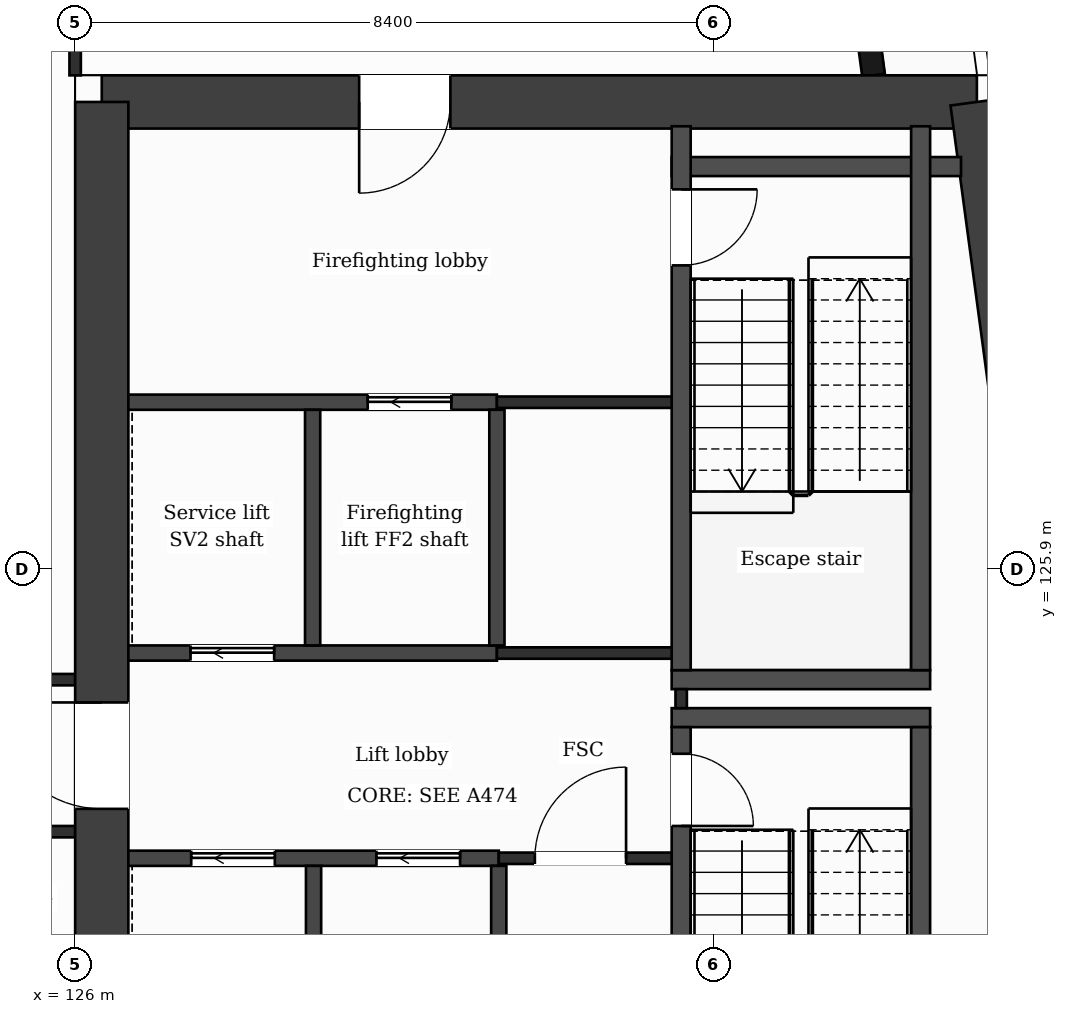
"""IFC4 building model, lengths in metres.
Left out: names, types, materials, properties, quantities, classifications, styles, units other than length and angle.
Written with IfcOpenShell. Run it as: python <this file> out.ifc"""

import sys

from ifc_helpers import new_model, si_unit, direction, frame, frame_2d, origin, place, context, subcontext, project, spatial, rectangle, extrude, element, fill, save


model = new_model("IFC4")
c1 = context("Model", 3, precision=1e-05, world=origin(), true_north=direction((0.0, 1.0)))
c2 = subcontext(c1, "Body", "Model", "MODEL_VIEW")
j1 = project(units=[si_unit("LENGTHUNIT", "METRE"), si_unit("PLANEANGLEUNIT", "RADIAN")], contexts=[c1])
p1 = place(None, origin())
s1 = spatial("IfcSite", under=j1, at=p1, CompositionType="ELEMENT")
p2 = place(p1, origin())
s2 = spatial("IfcBuilding", under=s1, at=p2, CompositionType="ELEMENT")
p3 = place(p2, frame((0.0, 0.0, 299.7)))
s3 = spatial("IfcBuildingStorey", under=s2, at=p3, CompositionType="ELEMENT", Elevation=299.7)
p4 = place(p3, frame((126.35, 132.05, 0.0), z_axis=(0.0, 0.0, 1.0), x_axis=(1.0, 0.0, 0.0)))
e1 = element("IfcWall", 1, at=p4, inside=s3, PredefinedType="SHEAR", context=c2, shape_type="SweptSolid", body=[
    extrude(rectangle(XDim=11.513, YDim=0.7, at=frame_2d((5.757, 0.0))), origin(), (0.0, 0.0, 1.0), 3.7),
])
p5 = place(p4, frame((3.386, 0.0, 0.0)))
e2 = element("IfcOpeningElement", 2, at=p5, cuts=e1, PredefinedType="OPENING", context=c2, shape_type="SweptSolid", body=[
    extrude(rectangle(XDim=1.2, YDim=2.1, at=frame_2d((0.6, 1.05))), frame((0.0, 0.36, 0.0), z_axis=(0.0, -1.0, 0.0), x_axis=(1.0, 0.0, 0.0)), (0.0, 0.0, 1.0), 0.72),
])
p6 = place(p3, frame((137.863, 132.05, 0.0), z_axis=(0.0, 0.0, 1.0), x_axis=(0.133401241494, -0.991062111458, 0.0)))
e3 = element("IfcWall", 3, at=p6, inside=s3, PredefinedType="SHEAR", context=c2, shape_type="SweptSolid", body=[
    extrude(rectangle(XDim=15.842, YDim=0.7, at=frame_2d((7.921, 0.0))), origin(), (0.0, 0.0, 1.0), 3.7),
])
p7 = place(p3, frame((126.35, 116.35, 0.0), z_axis=(0.0, 0.0, 1.0), x_axis=(0.0, 1.0, 0.0)))
e4 = element("IfcWall", 4, at=p7, inside=s3, PredefinedType="SHEAR", context=c2, shape_type="SweptSolid", body=[
    extrude(rectangle(XDim=15.7, YDim=0.7, at=frame_2d((7.85, 0.0))), origin(), (0.0, 0.0, 1.0), 3.7),
])
p8 = place(p7, frame((6.4, 0.0, 0.0)))
e5 = element("IfcOpeningElement", 5, at=p8, cuts=e4, PredefinedType="OPENING", context=c2, shape_type="SweptSolid", body=[
    extrude(rectangle(XDim=1.4, YDim=2.1, at=frame_2d((0.7, 1.05))), frame((0.0, 0.36, 0.0), z_axis=(0.0, -1.0, 0.0), x_axis=(1.0, 0.0, 0.0)), (0.0, 0.0, 1.0), 0.72),
])
p9 = place(p3, frame((136.504, 132.4, 0.0), z_axis=(0.0, 0.0, 1.0), x_axis=(-0.133399697462, 0.99106231929, 0.0)))
e6 = element("IfcWall", 6, at=p9, inside=s3, PredefinedType="SOLIDWALL", context=c2, shape_type="SweptSolid", body=[
    extrude(rectangle(XDim=6.74, YDim=0.3, at=frame_2d((3.37, 0.0))), origin(), (0.0, 0.0, 1.0), 3.25),
])
p10 = place(p9, frame((1.115, 0.0, 0.0)))
e7 = element("IfcOpeningElement", 7, at=p10, cuts=e6, PredefinedType="OPENING", context=c2, shape_type="SweptSolid", body=[
    extrude(rectangle(XDim=1.2, YDim=2.4, at=frame_2d((0.6, 1.2))), frame((0.0, 0.16, 0.0), z_axis=(0.0, -1.0, 0.0), x_axis=(1.0, 0.0, 0.0)), (0.0, 0.0, 1.0), 0.32),
])
p11 = place(p9, frame((4.436, 0.0, 0.9)))
e8 = element("IfcOpeningElement", 8, at=p11, cuts=e6, PredefinedType="OPENING", context=c2, shape_type="SweptSolid", body=[
    extrude(rectangle(XDim=1.2, YDim=2.1, at=frame_2d((0.6, 1.05))), frame((0.0, 0.16, 0.0), z_axis=(0.0, -1.0, 0.0), x_axis=(1.0, 0.0, 0.0)), (0.0, 0.0, 1.0), 0.32),
])
p12 = place(p3, frame((126.7, 122.1, 0.0), z_axis=(0.0, 0.0, 1.0), x_axis=(1.0, 0.0, 0.0)))
e9 = element("IfcWall", 9, at=p12, inside=s3, PredefinedType="PARTITIONING", context=c2, shape_type="SweptSolid", body=[
    extrude(rectangle(XDim=4.873, YDim=0.2, at=frame_2d((2.437, 0.0))), origin(), (0.0, 0.0, 1.0), 3.25),
])
p13 = place(p12, frame((3.264, 0.0, 0.0)))
e10 = element("IfcOpeningElement", 10, at=p13, cuts=e9, PredefinedType="OPENING", context=c2, shape_type="SweptSolid", body=[
    extrude(rectangle(XDim=1.1, YDim=2.1, at=frame_2d((0.55, 1.05))), frame((0.0, 0.11, 0.0), z_axis=(0.0, -1.0, 0.0), x_axis=(1.0, 0.0, 0.0)), (0.0, 0.0, 1.0), 0.22),
])
p14 = place(p12, frame((0.827, 0.0, 0.0)))
e11 = element("IfcOpeningElement", 11, at=p14, cuts=e9, PredefinedType="OPENING", context=c2, shape_type="SweptSolid", body=[
    extrude(rectangle(XDim=1.1, YDim=2.1, at=frame_2d((0.55, 1.05))), frame((0.0, 0.11, 0.0), z_axis=(0.0, -1.0, 0.0), x_axis=(1.0, 0.0, 0.0)), (0.0, 0.0, 1.0), 0.22),
])
p15 = place(p3, frame((131.573, 122.1, 0.0), z_axis=(0.0, 0.0, 1.0), x_axis=(1.0, 0.0, 0.0)))
e12 = element("IfcWall", 12, at=p15, inside=s3, PredefinedType="PARTITIONING", context=c2, shape_type="SweptSolid", body=[
    extrude(rectangle(XDim=2.4, YDim=0.15, at=frame_2d((1.2, 0.0))), origin(), (0.0, 0.0, 1.0), 3.25),
])
p16 = place(p15, frame((0.475, 0.0, 0.0)))
e13 = element("IfcOpeningElement", 13, at=p16, cuts=e12, PredefinedType="OPENING", context=c2, shape_type="SweptSolid", body=[
    extrude(rectangle(XDim=1.2, YDim=2.1, at=frame_2d((0.6, 1.05))), frame((0.0, 0.085, 0.0), z_axis=(0.0, -1.0, 0.0), x_axis=(1.0, 0.0, 0.0)), (0.0, 0.0, 1.0), 0.17),
])
p17 = place(p3, frame((100.8, 122.45, 0.0), z_axis=(0.0, 0.0, 1.0), x_axis=(1.0, 0.0, 0.0)))
e14 = element("IfcWall", 14, at=p17, inside=s3, PredefinedType="PARTITIONING", context=c2, shape_type="SweptSolid", body=[
    extrude(rectangle(XDim=25.2, YDim=0.15, at=frame_2d((12.6, 0.0))), origin(), (0.0, 0.0, 1.0), 3.25),
])
p18 = place(p17, frame((1.6, 0.0, 0.0)))
e15 = element("IfcOpeningElement", 15, at=p18, cuts=e14, PredefinedType="OPENING", context=c2, shape_type="SweptSolid", body=[
    extrude(rectangle(XDim=1.0, YDim=2.1, at=frame_2d((0.5, 1.05))), frame((0.0, 0.085, 0.0), z_axis=(0.0, -1.0, 0.0), x_axis=(1.0, 0.0, 0.0)), (0.0, 0.0, 1.0), 0.17),
])
p19 = place(p17, frame((11.12, 0.0, 0.0)))
e16 = element("IfcOpeningElement", 16, at=p19, cuts=e14, PredefinedType="OPENING", context=c2, shape_type="SweptSolid", body=[
    extrude(rectangle(XDim=0.95, YDim=2.1, at=frame_2d((0.475, 1.05))), frame((0.0, 0.085, 0.0), z_axis=(0.0, -1.0, 0.0), x_axis=(1.0, 0.0, 0.0)), (0.0, 0.0, 1.0), 0.17),
])
p20 = place(p17, frame((13.05, 0.0, 0.0)))
e17 = element("IfcOpeningElement", 17, at=p20, cuts=e14, PredefinedType="OPENING", context=c2, shape_type="SweptSolid", body=[
    extrude(rectangle(XDim=1.0, YDim=2.1, at=frame_2d((0.5, 1.05))), frame((0.0, 0.085, 0.0), z_axis=(0.0, -1.0, 0.0), x_axis=(1.0, 0.0, 0.0)), (0.0, 0.0, 1.0), 0.17),
])
p21 = place(p17, frame((19.61, 0.0, 0.0)))
e18 = element("IfcOpeningElement", 18, at=p21, cuts=e14, PredefinedType="OPENING", context=c2, shape_type="SweptSolid", body=[
    extrude(rectangle(XDim=0.95, YDim=2.1, at=frame_2d((0.475, 1.05))), frame((0.0, 0.085, 0.0), z_axis=(0.0, -1.0, 0.0), x_axis=(1.0, 0.0, 0.0)), (0.0, 0.0, 1.0), 0.17),
])
p22 = place(p17, frame((21.275, 0.0, 0.0)))
e19 = element("IfcOpeningElement", 19, at=p22, cuts=e14, PredefinedType="OPENING", context=c2, shape_type="SweptSolid", body=[
    extrude(rectangle(XDim=0.95, YDim=2.1, at=frame_2d((0.475, 1.05))), frame((0.0, 0.085, 0.0), z_axis=(0.0, -1.0, 0.0), x_axis=(1.0, 0.0, 0.0)), (0.0, 0.0, 1.0), 0.17),
])
for number, where, z_axis, x_axis in (
    (20, (133.848, 123.95, 0.0), (0.0, 0.0, 1.0), (1.0, 0.0, 0.0)),
    (21, (133.848, 124.45, 0.0), (0.0, 0.0, 1.0), (1.0, 0.0, 0.0)),
):
    element("IfcWall", number, at=place(p3, frame(where, z_axis=z_axis, x_axis=x_axis)), inside=s3, PredefinedType="PARTITIONING", context=c2, shape_type="SweptSolid", body=[
        extrude(rectangle(XDim=3.4, YDim=0.25, at=frame_2d((1.7, 0.0))), origin(), (0.0, 0.0, 1.0), 3.25),
    ])
p23 = place(p3, frame((100.8, 124.45, 0.0), z_axis=(0.0, 0.0, 1.0), x_axis=(1.0, 0.0, 0.0)))
e22 = element("IfcWall", 22, at=p23, inside=s3, PredefinedType="PARTITIONING", context=c2, shape_type="SweptSolid", body=[
    extrude(rectangle(XDim=25.2, YDim=0.15, at=frame_2d((12.6, 0.0))), origin(), (0.0, 0.0, 1.0), 3.25),
])
p24 = place(p23, frame((1.85, 0.0, 0.0)))
e23 = element("IfcOpeningElement", 23, at=p24, cuts=e22, PredefinedType="OPENING", context=c2, shape_type="SweptSolid", body=[
    extrude(rectangle(XDim=1.0, YDim=2.1, at=frame_2d((0.5, 1.05))), frame((0.0, 0.085, 0.0), z_axis=(0.0, -1.0, 0.0), x_axis=(1.0, 0.0, 0.0)), (0.0, 0.0, 1.0), 0.17),
])
p25 = place(p23, frame((6.425, 0.0, 0.0)))
e24 = element("IfcOpeningElement", 24, at=p25, cuts=e22, PredefinedType="OPENING", context=c2, shape_type="SweptSolid", body=[
    extrude(rectangle(XDim=1.0, YDim=2.1, at=frame_2d((0.5, 1.05))), frame((0.0, 0.085, 0.0), z_axis=(0.0, -1.0, 0.0), x_axis=(1.0, 0.0, 0.0)), (0.0, 0.0, 1.0), 0.17),
])
p26 = place(p23, frame((9.4, 0.0, 0.0)))
e25 = element("IfcOpeningElement", 25, at=p26, cuts=e22, PredefinedType="OPENING", context=c2, shape_type="SweptSolid", body=[
    extrude(rectangle(XDim=1.0, YDim=2.1, at=frame_2d((0.5, 1.05))), frame((0.0, 0.085, 0.0), z_axis=(0.0, -1.0, 0.0), x_axis=(1.0, 0.0, 0.0)), (0.0, 0.0, 1.0), 0.17),
])
p27 = place(p23, frame((14.825, 0.0, 0.0)))
e26 = element("IfcOpeningElement", 26, at=p27, cuts=e22, PredefinedType="OPENING", context=c2, shape_type="SweptSolid", body=[
    extrude(rectangle(XDim=1.0, YDim=2.1, at=frame_2d((0.5, 1.05))), frame((0.0, 0.085, 0.0), z_axis=(0.0, -1.0, 0.0), x_axis=(1.0, 0.0, 0.0)), (0.0, 0.0, 1.0), 0.17),
])
p28 = place(p23, frame((18.825, 0.0, 0.0)))
e27 = element("IfcOpeningElement", 27, at=p28, cuts=e22, PredefinedType="OPENING", context=c2, shape_type="SweptSolid", body=[
    extrude(rectangle(XDim=1.0, YDim=2.1, at=frame_2d((0.5, 1.05))), frame((0.0, 0.085, 0.0), z_axis=(0.0, -1.0, 0.0), x_axis=(1.0, 0.0, 0.0)), (0.0, 0.0, 1.0), 0.17),
])
p29 = place(p3, frame((126.7, 124.8, 0.0), z_axis=(0.0, 0.0, 1.0), x_axis=(1.0, 0.0, 0.0)))
e28 = element("IfcWall", 28, at=p29, inside=s3, PredefinedType="PARTITIONING", context=c2, shape_type="SweptSolid", body=[
    extrude(rectangle(XDim=4.849, YDim=0.2, at=frame_2d((2.424, 0.0))), origin(), (0.0, 0.0, 1.0), 3.25),
])
p30 = place(p29, frame((0.818, 0.0, 0.0)))
e29 = element("IfcOpeningElement", 29, at=p30, cuts=e28, PredefinedType="OPENING", context=c2, shape_type="SweptSolid", body=[
    extrude(rectangle(XDim=1.1, YDim=2.1, at=frame_2d((0.55, 1.05))), frame((0.0, 0.11, 0.0), z_axis=(0.0, -1.0, 0.0), x_axis=(1.0, 0.0, 0.0)), (0.0, 0.0, 1.0), 0.22),
])
p31 = place(p3, frame((131.549, 124.8, 0.0), z_axis=(0.0, 0.0, 1.0), x_axis=(1.0, 0.0, 0.0)))
e30 = element("IfcWall", 30, at=p31, inside=s3, PredefinedType="PARTITIONING", context=c2, shape_type="SweptSolid", body=[
    extrude(rectangle(XDim=2.549, YDim=0.15, at=frame_2d((1.275, 0.0))), origin(), (0.0, 0.0, 1.0), 3.25),
])
p32 = place(p3, frame((126.7, 128.1, 0.0), z_axis=(0.0, 0.0, 1.0), x_axis=(1.0, 0.0, 0.0)))
e31 = element("IfcWall", 31, at=p32, inside=s3, PredefinedType="PARTITIONING", context=c2, shape_type="SweptSolid", body=[
    extrude(rectangle(XDim=4.849, YDim=0.2, at=frame_2d((2.424, 0.0))), origin(), (0.0, 0.0, 1.0), 3.25),
])
p33 = place(p32, frame((3.149, 0.0, 0.0)))
e32 = element("IfcOpeningElement", 32, at=p33, cuts=e31, PredefinedType="OPENING", context=c2, shape_type="SweptSolid", body=[
    extrude(rectangle(XDim=1.1, YDim=2.1, at=frame_2d((0.55, 1.05))), frame((0.0, 0.11, 0.0), z_axis=(0.0, -1.0, 0.0), x_axis=(1.0, 0.0, 0.0)), (0.0, 0.0, 1.0), 0.22),
])
p34 = place(p3, frame((131.549, 128.1, 0.0), z_axis=(0.0, 0.0, 1.0), x_axis=(1.0, 0.0, 0.0)))
e33 = element("IfcWall", 33, at=p34, inside=s3, PredefinedType="PARTITIONING", context=c2, shape_type="SweptSolid", body=[
    extrude(rectangle(XDim=2.424, YDim=0.15, at=frame_2d((1.212, 0.0))), origin(), (0.0, 0.0, 1.0), 3.25),
])
p35 = place(p3, frame((133.848, 131.2, 0.0), z_axis=(0.0, 0.0, 1.0), x_axis=(1.0, 0.0, 0.0)))
e34 = element("IfcWall", 34, at=p35, inside=s3, PredefinedType="PARTITIONING", context=c2, shape_type="SweptSolid", body=[
    extrude(rectangle(XDim=3.807, YDim=0.25, at=frame_2d((1.903, 0.0))), origin(), (0.0, 0.0, 1.0), 3.25),
])
p36 = place(p3, frame((126.0, 132.4, 0.0), z_axis=(0.0, 0.0, 1.0), x_axis=(0.0, 1.0, 0.0)))
e35 = element("IfcWall", 35, at=p36, inside=s3, PredefinedType="PARTITIONING", context=c2, shape_type="SweptSolid", body=[
    extrude(rectangle(XDim=1.325, YDim=0.15, at=frame_2d((0.663, 0.0))), origin(), (0.0, 0.0, 1.0), 3.25),
])
for number, where, z_axis, x_axis in (
    (36, (129.124, 124.9, 0.0), (0.0, 0.0, 1.0), (0.0, 1.0, 0.0)),
    (37, (129.136, 118.9, 0.0), (0.0, 0.0, 1.0), (0.0, 1.0, 0.0)),
    (38, (131.549, 124.9, 0.0), (0.0, 0.0, 1.0), (0.0, 1.0, 0.0)),
):
    element("IfcWall", number, at=place(p3, frame(where, z_axis=z_axis, x_axis=x_axis)), inside=s3, PredefinedType="PARTITIONING", context=c2, shape_type="SweptSolid", body=[
        extrude(rectangle(XDim=3.1, YDim=0.2, at=frame_2d((1.55, 0.0))), origin(), (0.0, 0.0, 1.0), 3.25),
    ])
p37 = place(p3, frame((131.573, 116.67, 0.0), z_axis=(0.0, 0.0, 1.0), x_axis=(0.0, 1.0, 0.0)))
e39 = element("IfcWall", 39, at=p37, inside=s3, PredefinedType="PARTITIONING", context=c2, shape_type="SweptSolid", body=[
    extrude(rectangle(XDim=5.33, YDim=0.2, at=frame_2d((2.665, 0.0))), origin(), (0.0, 0.0, 1.0), 3.25),
])
p38 = place(p37, frame((0.88, 0.0, 0.0)))
e40 = element("IfcOpeningElement", 40, at=p38, cuts=e39, PredefinedType="OPENING", context=c2, shape_type="SweptSolid", body=[
    extrude(rectangle(XDim=0.9, YDim=2.1, at=frame_2d((0.45, 1.05))), frame((0.0, 0.11, 0.0), z_axis=(0.0, -1.0, 0.0), x_axis=(1.0, 0.0, 0.0)), (0.0, 0.0, 1.0), 0.22),
])
p39 = place(p3, frame((133.973, 124.075, 0.0), z_axis=(0.0, 0.0, 1.0), x_axis=(0.0, 1.0, 0.0)))
e41 = element("IfcWall", 41, at=p39, inside=s3, PredefinedType="PARTITIONING", context=c2, shape_type="SweptSolid", body=[
    extrude(rectangle(XDim=0.25, YDim=0.15, at=frame_2d((0.125, 0.0))), origin(), (0.0, 0.0, 1.0), 3.25),
])
p40 = place(p3, frame((133.973, 116.67, 0.0), z_axis=(0.0, 0.0, 1.0), x_axis=(0.0, 1.0, 0.0)))
e42 = element("IfcWall", 42, at=p40, inside=s3, PredefinedType="PARTITIONING", context=c2, shape_type="SweptSolid", body=[
    extrude(rectangle(XDim=7.155, YDim=0.25, at=frame_2d((3.578, 0.0))), origin(), (0.0, 0.0, 1.0), 3.25),
])
p41 = place(p40, frame((5.855, 0.0, 0.0)))
e43 = element("IfcOpeningElement", 43, at=p41, cuts=e42, PredefinedType="OPENING", context=c2, shape_type="SweptSolid", body=[
    extrude(rectangle(XDim=0.95, YDim=2.1, at=frame_2d((0.475, 1.05))), frame((0.0, 0.135, 0.0), z_axis=(0.0, -1.0, 0.0), x_axis=(1.0, 0.0, 0.0)), (0.0, 0.0, 1.0), 0.27),
])
p42 = place(p3, frame((133.973, 124.575, 0.0), z_axis=(0.0, 0.0, 1.0), x_axis=(0.0, 1.0, 0.0)))
e44 = element("IfcWall", 44, at=p42, inside=s3, PredefinedType="PARTITIONING", context=c2, shape_type="SweptSolid", body=[
    extrude(rectangle(XDim=7.155, YDim=0.25, at=frame_2d((3.578, 0.0))), origin(), (0.0, 0.0, 1.0), 3.25),
])
p43 = place(p42, frame((5.325, 0.0, 0.0)))
e45 = element("IfcOpeningElement", 45, at=p43, cuts=e44, PredefinedType="OPENING", context=c2, shape_type="SweptSolid", body=[
    extrude(rectangle(XDim=1.0, YDim=2.1, at=frame_2d((0.5, 1.05))), frame((0.0, 0.135, 0.0), z_axis=(0.0, -1.0, 0.0), x_axis=(1.0, 0.0, 0.0)), (0.0, 0.0, 1.0), 0.27),
])
for number, where, z_axis, x_axis in (
    (46, (137.123, 116.67, 0.0), (0.0, 0.0, 1.0), (0.0, 1.0, 0.0)),
    (47, (137.123, 124.575, 0.0), (0.0, 0.0, 1.0), (0.0, 1.0, 0.0)),
):
    element("IfcWall", number, at=place(p3, frame(where, z_axis=z_axis, x_axis=x_axis)), inside=s3, PredefinedType="PARTITIONING", context=c2, shape_type="SweptSolid", body=[
        extrude(rectangle(XDim=7.155, YDim=0.25, at=frame_2d((3.578, 0.0))), origin(), (0.0, 0.0, 1.0), 3.25),
    ])
p44 = place(p16, origin())
e48 = element("IfcDoor", 48, at=p44, inside=s3, OperationType="SINGLE_SWING_RIGHT", PredefinedType="DOOR", context=c2, shape_type="SweptSolid", body=[
    extrude(rectangle(XDim=1.2, YDim=2.1, at=frame_2d((0.6, 1.05))), frame((0.0, 0.025, 0.0), z_axis=(0.0, -1.0, 0.0), x_axis=(1.0, 0.0, 0.0)), (0.0, 0.0, 1.0), 0.05),
])
fill(e13, e48)
p45 = place(p13, origin())
e49 = element("IfcDoor", 49, at=p45, inside=s3, OperationType="SLIDING_TO_LEFT", PredefinedType="DOOR", context=c2, shape_type="SweptSolid", body=[
    extrude(rectangle(XDim=1.1, YDim=2.1, at=frame_2d((0.55, 1.05))), frame((0.0, 0.025, 0.0), z_axis=(0.0, -1.0, 0.0), x_axis=(1.0, 0.0, 0.0)), (0.0, 0.0, 1.0), 0.05),
])
fill(e10, e49)
p46 = place(p14, origin())
e50 = element("IfcDoor", 50, at=p46, inside=s3, OperationType="SLIDING_TO_LEFT", PredefinedType="DOOR", context=c2, shape_type="SweptSolid", body=[
    extrude(rectangle(XDim=1.1, YDim=2.1, at=frame_2d((0.55, 1.05))), frame((0.0, 0.025, 0.0), z_axis=(0.0, -1.0, 0.0), x_axis=(1.0, 0.0, 0.0)), (0.0, 0.0, 1.0), 0.05),
])
fill(e11, e50)
p47 = place(p33, origin())
e51 = element("IfcDoor", 51, at=p47, inside=s3, OperationType="SLIDING_TO_LEFT", PredefinedType="DOOR", context=c2, shape_type="SweptSolid", body=[
    extrude(rectangle(XDim=1.1, YDim=2.1, at=frame_2d((0.55, 1.05))), frame((0.0, 0.025, 0.0), z_axis=(0.0, -1.0, 0.0), x_axis=(1.0, 0.0, 0.0)), (0.0, 0.0, 1.0), 0.05),
])
fill(e32, e51)
p48 = place(p30, origin())
e52 = element("IfcDoor", 52, at=p48, inside=s3, OperationType="SLIDING_TO_LEFT", PredefinedType="DOOR", context=c2, shape_type="SweptSolid", body=[
    extrude(rectangle(XDim=1.1, YDim=2.1, at=frame_2d((0.55, 1.05))), frame((0.0, 0.025, 0.0), z_axis=(0.0, -1.0, 0.0), x_axis=(1.0, 0.0, 0.0)), (0.0, 0.0, 1.0), 0.05),
])
fill(e29, e52)
p49 = place(p41, origin())
e53 = element("IfcDoor", 53, at=p49, inside=s3, OperationType="SINGLE_SWING_LEFT", PredefinedType="DOOR", context=c2, shape_type="SweptSolid", body=[
    extrude(rectangle(XDim=0.95, YDim=2.1, at=frame_2d((0.475, 1.05))), frame((0.0, 0.025, 0.0), z_axis=(0.0, -1.0, 0.0), x_axis=(1.0, 0.0, 0.0)), (0.0, 0.0, 1.0), 0.05),
])
fill(e43, e53)
p50 = place(p43, origin())
e54 = element("IfcDoor", 54, at=p50, inside=s3, OperationType="SINGLE_SWING_RIGHT", PredefinedType="DOOR", context=c2, shape_type="SweptSolid", body=[
    extrude(rectangle(XDim=1.0, YDim=2.1, at=frame_2d((0.5, 1.05))), frame((0.0, 0.025, 0.0), z_axis=(0.0, -1.0, 0.0), x_axis=(1.0, 0.0, 0.0)), (0.0, 0.0, 1.0), 0.05),
])
fill(e45, e54)
p51 = place(p5, origin())
e55 = element("IfcDoor", 55, at=p51, inside=s3, OperationType="SINGLE_SWING_LEFT", PredefinedType="DOOR", context=c2, shape_type="SweptSolid", body=[
    extrude(rectangle(XDim=1.2, YDim=2.1, at=frame_2d((0.6, 1.05))), frame((0.0, 0.025, 0.0), z_axis=(0.0, -1.0, 0.0), x_axis=(1.0, 0.0, 0.0)), (0.0, 0.0, 1.0), 0.05),
])
fill(e2, e55)
p52 = place(p8, origin())
e56 = element("IfcDoor", 56, at=p52, inside=s3, OperationType="SINGLE_SWING_RIGHT", PredefinedType="DOOR", context=c2, shape_type="SweptSolid", body=[
    extrude(rectangle(XDim=1.4, YDim=2.1, at=frame_2d((0.7, 1.05))), frame((0.0, 0.025, 0.0), z_axis=(0.0, -1.0, 0.0), x_axis=(1.0, 0.0, 0.0)), (0.0, 0.0, 1.0), 0.05),
])
fill(e5, e56)
save(model, sys.argv[1])
